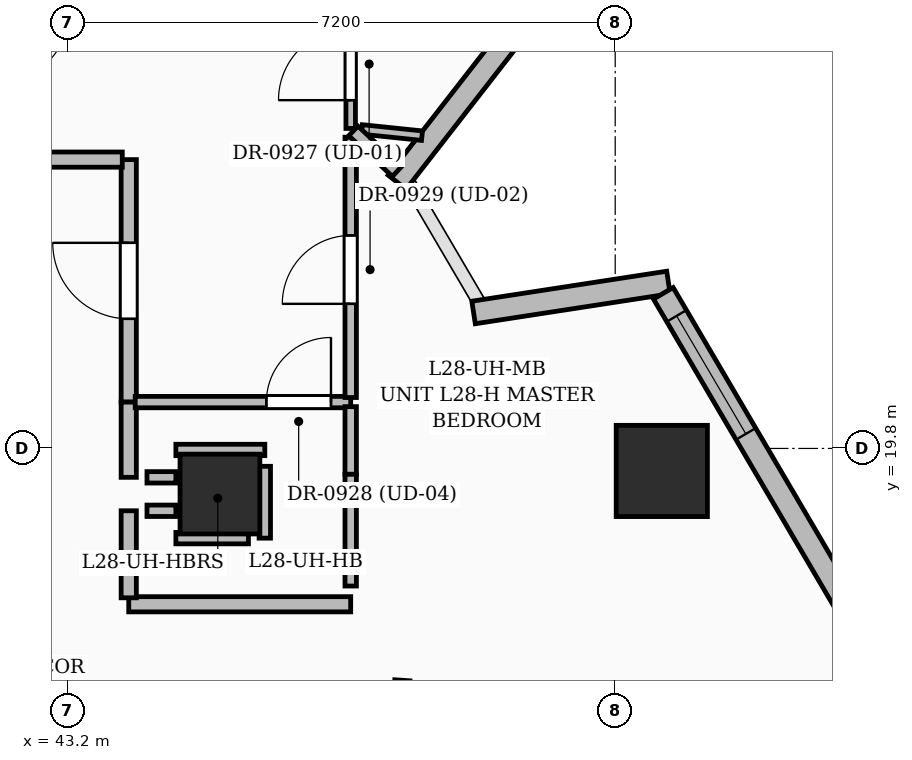
"""IFC4 building model, lengths in metres.
Left out: names, types, materials, properties, quantities, classifications, styles, units other than length and angle.
Written with IfcOpenShell. Run it as: python <this file> out.ifc"""

import sys

from ifc_helpers import new_model, si_unit, direction, frame, frame_2d, origin, origin_2d, place, context, subcontext, project, spatial, rectangle, extrude, element, fill, save


model = new_model("IFC4")
c1 = context("Model", 3, precision=1e-05, world=origin(), true_north=direction((0.0, 1.0)))
c2 = subcontext(c1, "Body", "Model", "MODEL_VIEW")
j1 = project(units=[si_unit("LENGTHUNIT", "METRE"), si_unit("PLANEANGLEUNIT", "RADIAN")], contexts=[c1])
p1 = place(None, origin())
s1 = spatial("IfcSite", under=j1, at=p1, CompositionType="ELEMENT")
p2 = place(p1, origin())
s2 = spatial("IfcBuilding", under=s1, at=p2, CompositionType="ELEMENT")
p3 = place(p2, frame((0.0, 0.0, 114.0)))
s3 = spatial("IfcBuildingStorey", under=s2, at=p3, CompositionType="ELEMENT", Elevation=114.0)
p4 = place(p3, frame((45.2, 19.2, 0.0), z_axis=(0.0, 0.0, 1.0), x_axis=(1.0, 0.0, 0.0)))
e1 = element("IfcColumn", 1, at=p4, inside=s3, PredefinedType="COLUMN", context=c2, shape_type="SweptSolid", body=[
    extrude(rectangle(XDim=1.05, YDim=1.05, at=origin_2d()), origin(), (0.0, 0.0, 1.0), 3.6),
])
p5 = place(p3, frame((51.013, 19.504, 0.0), z_axis=(0.0, 0.0, 1.0), x_axis=(1.0, 0.0, 0.0)))
e2 = element("IfcColumn", 2, at=p5, inside=s3, PredefinedType="COLUMN", context=c2, shape_type="SweptSolid", body=[
    extrude(rectangle(XDim=1.2, YDim=1.2, at=origin_2d()), origin(), (0.0, 0.0, 1.0), 3.6),
])
p6 = place(p3, frame((48.955, 25.132, 0.0), z_axis=(0.0, 0.0, 1.0), x_axis=(-0.614326980446, -0.789051557946, 0.0)))
e3 = element("IfcWall", 3, at=p6, inside=s3, PredefinedType="SOLIDWALL", context=c2, shape_type="SweptSolid", body=[
    extrude(rectangle(XDim=2.318, YDim=0.3, at=frame_2d((1.159, 0.0))), origin(), (0.0, 0.0, 1.0), 2.575),
])
p7 = place(p3, frame((48.537, 21.589, 0.0), z_axis=(0.0, 0.0, 1.0), x_axis=(0.988351014823, 0.152191561848, 0.0)))
e4 = element("IfcWall", 4, at=p7, inside=s3, PredefinedType="SOLIDWALL", context=c2, shape_type="SweptSolid", body=[
    extrude(rectangle(XDim=2.594, YDim=0.3, at=frame_2d((1.297, 0.0))), origin(), (0.0, 0.0, 1.0), 2.575),
])
p8 = place(p3, frame((51.033, 21.841, 0.0), z_axis=(0.0, 0.0, 1.0), x_axis=(0.506317595085, -0.862347083782, 0.0)))
e5 = element("IfcWall", 5, at=p8, inside=s3, PredefinedType="SOLIDWALL", context=c2, shape_type="SweptSolid", body=[
    extrude(rectangle(XDim=6.274, YDim=0.3, at=frame_2d((3.137, 0.0))), origin(), (0.0, 0.0, 1.0), 3.35),
])
p9 = place(p8, frame((0.345, 0.0, 0.6)))
e6 = element("IfcOpeningElement", 6, at=p9, cuts=e5, PredefinedType="OPENING", context=c2, shape_type="SweptSolid", body=[
    extrude(rectangle(XDim=1.8, YDim=2.1, at=frame_2d((0.9, 1.05))), frame((0.0, 0.16, 0.0), z_axis=(0.0, -1.0, 0.0), x_axis=(1.0, 0.0, 0.0)), (0.0, 0.0, 1.0), 0.32),
])
p10 = place(p3, frame((47.425, 14.2, 0.0), z_axis=(0.0, 0.0, 1.0), x_axis=(0.068484119878, 0.997652206595, 0.0)))
e7 = element("IfcWall", 7, at=p10, inside=s3, PredefinedType="PARTITIONING", context=c2, shape_type="SweptSolid", body=[
    extrude(rectangle(XDim=2.556, YDim=0.2, at=frame_2d((1.278, 0.0))), origin(), (0.0, 0.0, 1.0), 2.372),
])
p11 = place(p3, frame((44.0, 20.41, 0.0), z_axis=(0.0, 0.0, 1.0), x_axis=(0.0, 1.0, 0.0)))
e8 = element("IfcWall", 8, at=p11, inside=s3, PredefinedType="PARTITIONING", context=c2, shape_type="SweptSolid", body=[
    extrude(rectangle(XDim=3.19, YDim=0.2, at=frame_2d((1.595, 0.0))), origin(), (0.0, 0.0, 1.0), 2.436),
])
p12 = place(p11, frame((1.095, 0.0, 0.0)))
e9 = element("IfcOpeningElement", 9, at=p12, cuts=e8, PredefinedType="OPENING", context=c2, shape_type="SweptSolid", body=[
    extrude(rectangle(XDim=1.0, YDim=2.2, at=frame_2d((0.5, 1.1))), frame((0.0, 0.11, 0.0), z_axis=(0.0, -1.0, 0.0), x_axis=(1.0, 0.0, 0.0)), (0.0, 0.0, 1.0), 0.22),
])
p13 = place(p3, frame((43.915, 23.6, 0.0), z_axis=(0.0, 0.0, 1.0), x_axis=(-1.0, 0.0, 0.0)))
e10 = element("IfcWall", 10, at=p13, inside=s3, PredefinedType="PARTITIONING", context=c2, shape_type="SweptSolid", body=[
    extrude(rectangle(XDim=2.325, YDim=0.2, at=frame_2d((1.163, 0.0))), origin(), (0.0, 0.0, 1.0), 2.436),
])
p14 = place(p3, frame((46.92, 17.75, 0.0), z_axis=(0.0, 0.0, 1.0), x_axis=(-1.0, 0.0, 0.0)))
e11 = element("IfcWall", 11, at=p14, inside=s3, PredefinedType="PARTITIONING", context=c2, shape_type="SweptSolid", body=[
    extrude(rectangle(XDim=2.92, YDim=0.2, at=frame_2d((1.46, 0.0))), origin(), (0.0, 0.0, 1.0), 2.436),
])
p15 = place(p3, frame((44.0, 17.835, 0.0), z_axis=(0.0, 0.0, 1.0), x_axis=(0.0, 1.0, 0.0)))
e12 = element("IfcWall", 12, at=p15, inside=s3, PredefinedType="PARTITIONING", context=c2, shape_type="SweptSolid", body=[
    extrude(rectangle(XDim=1.145, YDim=0.2, at=frame_2d((0.573, 0.0))), origin(), (0.0, 0.0, 1.0), 3.35),
])
p16 = place(p3, frame((44.0, 19.42, 0.0), z_axis=(0.0, 0.0, 1.0), x_axis=(0.0, 1.0, 0.0)))
e13 = element("IfcWall", 13, at=p16, inside=s3, PredefinedType="PARTITIONING", context=c2, shape_type="SweptSolid", body=[
    extrude(rectangle(XDim=0.99, YDim=0.2, at=frame_2d((0.495, 0.0))), origin(), (0.0, 0.0, 1.0), 3.35),
])
p17 = place(p3, frame((44.085, 20.41, 0.0), z_axis=(0.0, 0.0, 1.0), x_axis=(1.0, 0.0, 0.0)))
e14 = element("IfcWall", 14, at=p17, inside=s3, PredefinedType="PARTITIONING", context=c2, shape_type="SweptSolid", body=[
    extrude(rectangle(XDim=2.835, YDim=0.15, at=frame_2d((1.417, 0.0))), origin(), (0.0, 0.0, 1.0), 2.372),
])
p18 = place(p17, frame((1.726, 0.0, 0.0)))
e15 = element("IfcOpeningElement", 15, at=p18, cuts=e14, PredefinedType="OPENING", context=c2, shape_type="SweptSolid", body=[
    extrude(rectangle(XDim=0.85, YDim=2.1, at=frame_2d((0.425, 1.05))), frame((0.0, 0.085, 0.0), z_axis=(0.0, -1.0, 0.0), x_axis=(1.0, 0.0, 0.0)), (0.0, 0.0, 1.0), 0.17),
])
p19 = place(p3, frame((46.92, 24.01, 0.0), z_axis=(0.0, 0.0, 1.0), x_axis=(0.0, 1.0, 0.0)))
e16 = element("IfcWall", 16, at=p19, inside=s3, PredefinedType="PARTITIONING", context=c2, shape_type="SweptSolid", body=[
    extrude(rectangle(XDim=1.81, YDim=0.125, at=frame_2d((0.905, 0.0))), origin(), (0.0, 0.0, 1.0), 2.372),
])
p20 = place(p19, frame((0.372, 0.0, 0.0)))
e17 = element("IfcOpeningElement", 17, at=p20, cuts=e16, PredefinedType="OPENING", context=c2, shape_type="SweptSolid", body=[
    extrude(rectangle(XDim=0.95, YDim=2.2, at=frame_2d((0.475, 1.1))), frame((0.0, 0.072, 0.0), z_axis=(0.0, -1.0, 0.0), x_axis=(1.0, 0.0, 0.0)), (0.0, 0.0, 1.0), 0.145),
])
p21 = place(p3, frame((46.92, 20.47, 0.0), z_axis=(0.0, 0.0, 1.0), x_axis=(0.0, 1.0, 0.0)))
e18 = element("IfcWall", 18, at=p21, inside=s3, PredefinedType="PARTITIONING", context=c2, shape_type="SweptSolid", body=[
    extrude(rectangle(XDim=3.425, YDim=0.15, at=frame_2d((1.712, 0.0))), origin(), (0.0, 0.0, 1.0), 2.712),
])
p22 = place(p21, frame((1.232, 0.0, 0.0)))
e19 = element("IfcOpeningElement", 19, at=p22, cuts=e18, PredefinedType="OPENING", context=c2, shape_type="SweptSolid", body=[
    extrude(rectangle(XDim=0.9, YDim=2.15, at=frame_2d((0.45, 1.075))), frame((0.0, 0.085, 0.0), z_axis=(0.0, -1.0, 0.0), x_axis=(1.0, 0.0, 0.0)), (0.0, 0.0, 1.0), 0.17),
])
p23 = place(p3, frame((43.0, 27.99, 0.0), z_axis=(0.0, 0.0, 1.0), x_axis=(-0.305803129518, -0.95209476733, 0.0)))
e20 = element("IfcWall", 20, at=p23, inside=s3, PredefinedType="PARTITIONING", context=c2, shape_type="SweptSolid", body=[
    extrude(rectangle(XDim=4.526, YDim=0.2, at=frame_2d((2.263, 0.0))), origin(), (0.0, 0.0, 1.0), 2.372),
])
p24 = place(p23, frame((2.519, 0.0, 0.0)))
e21 = element("IfcOpeningElement", 21, at=p24, cuts=e20, PredefinedType="OPENING", context=c2, shape_type="SweptSolid", body=[
    extrude(rectangle(XDim=1.0, YDim=2.2, at=frame_2d((0.5, 1.1))), frame((0.0, 0.11, 0.0), z_axis=(0.0, -1.0, 0.0), x_axis=(1.0, 0.0, 0.0)), (0.0, 0.0, 1.0), 0.22),
])
p25 = place(p3, frame((46.92, 19.46, 0.0), z_axis=(0.0, 0.0, 1.0), x_axis=(0.0, 1.0, 0.0)))
e22 = element("IfcWall", 22, at=p25, inside=s3, PredefinedType="PARTITIONING", context=c2, shape_type="SweptSolid", body=[
    extrude(rectangle(XDim=0.89, YDim=0.15, at=frame_2d((0.445, 0.0))), origin(), (0.0, 0.0, 1.0), 3.35),
])
p26 = place(p3, frame((47.067, 23.997, 0.0), z_axis=(0.0, 0.0, 1.0), x_axis=(0.99466575773, -0.103150523024, 0.0)))
e23 = element("IfcWall", 23, at=p26, inside=s3, PredefinedType="PARTITIONING", context=c2, shape_type="SweptSolid", body=[
    extrude(rectangle(XDim=0.795, YDim=0.125, at=frame_2d((0.397, 0.0))), origin(), (0.0, 0.0, 1.0), 3.35),
])
p27 = place(p3, frame((47.528, 23.443, 0.0), z_axis=(0.0, 0.0, 1.0), x_axis=(-0.731583247314, 0.681752119358, 0.0)))
e24 = element("IfcWall", 24, at=p27, inside=s3, PredefinedType="PARTITIONING", context=c2, shape_type="SweptSolid", body=[
    extrude(rectangle(XDim=0.784, YDim=0.175, at=frame_2d((0.392, 0.0))), origin(), (0.0, 0.0, 1.0), 3.35),
])
p28 = place(p3, frame((44.24, 19.42, 0.0), z_axis=(0.0, 0.0, 1.0), x_axis=(1.0, 0.0, 0.0)))
e25 = element("IfcWall", 25, at=p28, inside=s3, PredefinedType="PARTITIONING", context=c2, shape_type="SweptSolid", body=[
    extrude(rectangle(XDim=0.38, YDim=0.15, at=frame_2d((0.19, 0.0))), origin(), (0.0, 0.0, 1.0), 3.35),
])
p29 = place(p3, frame((44.62, 19.78, 0.0), z_axis=(0.0, 0.0, 1.0), x_axis=(1.0, 0.0, 0.0)))
e26 = element("IfcWall", 26, at=p29, inside=s3, PredefinedType="PARTITIONING", context=c2, shape_type="SweptSolid", body=[
    extrude(rectangle(XDim=1.17, YDim=0.15, at=frame_2d((0.585, 0.0))), origin(), (0.0, 0.0, 1.0), 2.372),
])
p30 = place(p3, frame((45.79, 19.565, 0.0), z_axis=(0.0, 0.0, 1.0), x_axis=(0.0, -1.0, 0.0)))
e27 = element("IfcWall", 27, at=p30, inside=s3, PredefinedType="PARTITIONING", context=c2, shape_type="SweptSolid", body=[
    extrude(rectangle(XDim=0.945, YDim=0.15, at=frame_2d((0.472, 0.0))), origin(), (0.0, 0.0, 1.0), 3.35),
])
p31 = place(p3, frame((45.575, 18.62, 0.0), z_axis=(0.0, 0.0, 1.0), x_axis=(-1.0, 0.0, 0.0)))
e28 = element("IfcWall", 28, at=p31, inside=s3, PredefinedType="PARTITIONING", context=c2, shape_type="SweptSolid", body=[
    extrude(rectangle(XDim=0.955, YDim=0.15, at=frame_2d((0.478, 0.0))), origin(), (0.0, 0.0, 1.0), 2.436),
])
p32 = place(p3, frame((44.62, 18.98, 0.0), z_axis=(0.0, 0.0, 1.0), x_axis=(-1.0, 0.0, 0.0)))
e29 = element("IfcWall", 29, at=p32, inside=s3, PredefinedType="PARTITIONING", context=c2, shape_type="SweptSolid", body=[
    extrude(rectangle(XDim=0.38, YDim=0.15, at=frame_2d((0.19, 0.0))), origin(), (0.0, 0.0, 1.0), 3.35),
])
p33 = place(p3, frame((46.92, 17.99, 0.0), z_axis=(0.0, 0.0, 1.0), x_axis=(0.0, 1.0, 0.0)))
e30 = element("IfcWall", 30, at=p33, inside=s3, PredefinedType="PARTITIONING", context=c2, shape_type="SweptSolid", body=[
    extrude(rectangle(XDim=1.47, YDim=0.15, at=frame_2d((0.735, 0.0))), origin(), (0.0, 0.0, 1.0), 3.35),
])
p34 = place(p9, origin())
e31 = element("IfcWindow", 31, at=p34, inside=s3, PartitioningType="SINGLE_PANEL", PredefinedType="WINDOW", context=c2, shape_type="SweptSolid", body=[
    extrude(rectangle(XDim=1.8, YDim=2.1, at=frame_2d((0.9, 1.05))), frame((0.0, 0.03, 0.0), z_axis=(0.0, -1.0, 0.0), x_axis=(1.0, 0.0, 0.0)), (0.0, 0.0, 1.0), 0.06),
])
fill(e6, e31)
p35 = place(p12, origin())
e32 = element("IfcDoor", 32, at=p35, inside=s3, OperationType="SINGLE_SWING_RIGHT", PredefinedType="DOOR", context=c2, shape_type="SweptSolid", body=[
    extrude(rectangle(XDim=1.0, YDim=2.2, at=frame_2d((0.5, 1.1))), frame((0.0, 0.025, 0.0), z_axis=(0.0, -1.0, 0.0), x_axis=(1.0, 0.0, 0.0)), (0.0, 0.0, 1.0), 0.05),
])
fill(e9, e32)
p36 = place(p20, origin())
e33 = element("IfcDoor", 33, at=p36, inside=s3, OperationType="SINGLE_SWING_LEFT", PredefinedType="DOOR", context=c2, shape_type="SweptSolid", body=[
    extrude(rectangle(XDim=0.95, YDim=2.2, at=frame_2d((0.475, 1.1))), frame((0.0, 0.025, 0.0), z_axis=(0.0, -1.0, 0.0), x_axis=(1.0, 0.0, 0.0)), (0.0, 0.0, 1.0), 0.05),
])
fill(e17, e33)
p37 = place(p18, origin())
e34 = element("IfcDoor", 34, at=p37, inside=s3, OperationType="SINGLE_SWING_RIGHT", PredefinedType="DOOR", context=c2, shape_type="SweptSolid", body=[
    extrude(rectangle(XDim=0.85, YDim=2.1, at=frame_2d((0.425, 1.05))), frame((0.0, 0.025, 0.0), z_axis=(0.0, -1.0, 0.0), x_axis=(1.0, 0.0, 0.0)), (0.0, 0.0, 1.0), 0.05),
])
fill(e15, e34)
p38 = place(p22, origin())
e35 = element("IfcDoor", 35, at=p38, inside=s3, OperationType="SINGLE_SWING_LEFT", PredefinedType="DOOR", context=c2, shape_type="SweptSolid", body=[
    extrude(rectangle(XDim=0.9, YDim=2.15, at=frame_2d((0.45, 1.075))), frame((0.0, 0.025, 0.0), z_axis=(0.0, -1.0, 0.0), x_axis=(1.0, 0.0, 0.0)), (0.0, 0.0, 1.0), 0.05),
])
fill(e19, e35)
save(model, sys.argv[1])
